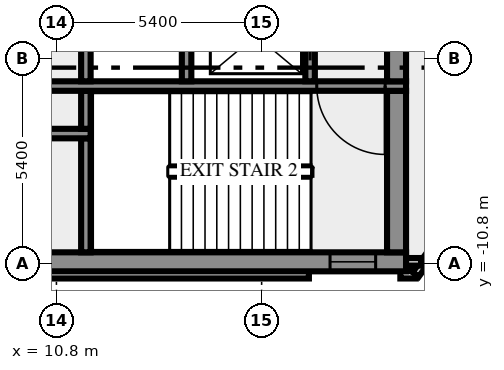
"""IFC4 building model, lengths in metres.
Left out: names, types, materials, properties, quantities, classifications, styles, units other than length and angle.
Written with IfcOpenShell. Run it as: python <this file> out.ifc"""

import sys

from ifc_helpers import new_model, si_unit, direction, frame, frame_2d, origin, place, context, subcontext, project, spatial, rectangle, extrude, element, fill, save


model = new_model("IFC4")
c1 = context("Model", 3, precision=1e-05, world=origin(), true_north=direction((0.0, 1.0)))
c2 = subcontext(c1, "Body", "Model", "MODEL_VIEW")
j1 = project(units=[si_unit("LENGTHUNIT", "METRE"), si_unit("PLANEANGLEUNIT", "RADIAN")], contexts=[c1])
p1 = place(None, origin())
s1 = spatial("IfcSite", under=j1, at=p1, CompositionType="ELEMENT")
p2 = place(p1, origin())
s2 = spatial("IfcBuilding", under=s1, at=p2, CompositionType="ELEMENT")
p3 = place(p2, frame((0.0, 0.0, 339.0)))
s3 = spatial("IfcBuildingStorey", under=s2, at=p3, CompositionType="ELEMENT", Elevation=339.0)
p4 = place(p3, frame((-17.444, -11.088, 0.0), z_axis=(0.0, 0.0, 1.0), x_axis=(1.0, 0.0, 0.0)))
e1 = element("IfcWall", 1, at=p4, inside=s3, PredefinedType="SOLIDWALL", context=c2, shape_type="SweptSolid", body=[
    extrude(rectangle(XDim=34.888, YDim=0.2, at=frame_2d((17.444, 0.0))), origin(), (0.0, 0.0, 1.0), 3.65),
])
p5 = place(p3, frame((19.85, -11.088, 0.0), z_axis=(0.0, 0.0, 1.0), x_axis=(1.0, 0.0, 0.0)))
e2 = element("IfcWall", 2, at=p5, inside=s3, PredefinedType="SOLIDWALL", context=c2, shape_type="SweptSolid", body=[
    extrude(rectangle(XDim=0.406, YDim=0.2, at=frame_2d((0.203, 0.0))), origin(), (0.0, 0.0, 1.0), 3.65),
])
p6 = place(p3, frame((20.253, -11.083, 0.0), z_axis=(0.0, 0.0, 1.0), x_axis=(0.587766567315, 0.809030569476, 0.0)))
e3 = element("IfcWall", 3, at=p6, inside=s3, PredefinedType="SOLIDWALL", context=c2, shape_type="SweptSolid", body=[
    extrude(rectangle(XDim=2.688, YDim=0.2, at=frame_2d((1.344, 0.0))), origin(), (0.0, 0.0, 1.0), 3.65),
])
p7 = place(p3, frame((19.98, -10.75, 0.0), z_axis=(0.0, 0.0, 1.0), x_axis=(1.0, 0.0, 0.0)))
e4 = element("IfcWall", 4, at=p7, inside=s3, PredefinedType="SOLIDWALL", context=c2, shape_type="SweptSolid", body=[
    extrude(rectangle(XDim=0.417, YDim=0.2, at=frame_2d((0.208, 0.0))), origin(), (0.0, 0.0, 1.0), 3.65),
])
p8 = place(p3, frame((-20.0, -10.75, 0.0), z_axis=(0.0, 0.0, 1.0), x_axis=(1.0, 0.0, 0.0)))
e5 = element("IfcWall", 5, at=p8, inside=s3, PredefinedType="SHEAR", context=c2, shape_type="SweptSolid", body=[
    extrude(rectangle(XDim=40.0, YDim=0.5, at=frame_2d((20.0, 0.0))), origin(), (0.0, 0.0, 1.0), 3.65),
])
p9 = place(p8, frame((0.8, 0.0, 1.0)))
e6 = element("IfcOpeningElement", 6, at=p9, cuts=e5, PredefinedType="OPENING", context=c2, shape_type="SweptSolid", body=[
    extrude(rectangle(XDim=1.2, YDim=1.2, at=frame_2d((0.6, 0.6))), frame((0.0, 0.26, 0.0), z_axis=(0.0, -1.0, 0.0), x_axis=(1.0, 0.0, 0.0)), (0.0, 0.0, 1.0), 0.52),
])
p10 = place(p8, frame((38.0, 0.0, 1.0)))
e7 = element("IfcOpeningElement", 7, at=p10, cuts=e5, PredefinedType="OPENING", context=c2, shape_type="SweptSolid", body=[
    extrude(rectangle(XDim=1.2, YDim=1.2, at=frame_2d((0.6, 0.6))), frame((0.0, 0.26, 0.0), z_axis=(0.0, -1.0, 0.0), x_axis=(1.0, 0.0, 0.0)), (0.0, 0.0, 1.0), 0.52),
])
p11 = place(p3, frame((11.575, -10.5, 0.0), z_axis=(0.0, 0.0, 1.0), x_axis=(0.0, 1.0, 0.0)))
e8 = element("IfcWall", 8, at=p11, inside=s3, PredefinedType="SHEAR", context=c2, shape_type="SweptSolid", body=[
    extrude(rectangle(XDim=3.0, YDim=0.25, at=frame_2d((1.5, 0.0))), origin(), (0.0, 0.0, 1.0), 3.65),
])
p12 = place(p3, frame((19.75, -10.5, 0.0), z_axis=(0.0, 0.0, 1.0), x_axis=(0.0, 1.0, 0.0)))
e9 = element("IfcWall", 9, at=p12, inside=s3, PredefinedType="SHEAR", context=c2, shape_type="SweptSolid", body=[
    extrude(rectangle(XDim=4.25, YDim=0.5, at=frame_2d((2.125, 0.0))), origin(), (0.0, 0.0, 1.0), 3.65),
])
p13 = place(p3, frame((11.7, -7.375, 0.0), z_axis=(0.0, 0.0, 1.0), x_axis=(-1.0, 0.0, 0.0)))
e10 = element("IfcWall", 10, at=p13, inside=s3, PredefinedType="SHEAR", context=c2, shape_type="SweptSolid", body=[
    extrude(rectangle(XDim=23.4, YDim=0.25, at=frame_2d((11.7, 0.0))), origin(), (0.0, 0.0, 1.0), 3.65),
])
p14 = place(p13, frame((22.225, 0.0, 0.0)))
e11 = element("IfcOpeningElement", 11, at=p14, cuts=e10, PredefinedType="OPENING", context=c2, shape_type="SweptSolid", body=[
    extrude(rectangle(XDim=0.8, YDim=2.1, at=frame_2d((0.4, 1.05))), frame((0.0, 0.135, 0.0), z_axis=(0.0, -1.0, 0.0), x_axis=(1.0, 0.0, 0.0)), (0.0, 0.0, 1.0), 0.27),
])
p15 = place(p13, frame((20.2, 0.0, 0.0)))
e12 = element("IfcOpeningElement", 12, at=p15, cuts=e10, PredefinedType="OPENING", context=c2, shape_type="SweptSolid", body=[
    extrude(rectangle(XDim=1.1, YDim=2.1, at=frame_2d((0.55, 1.05))), frame((0.0, 0.135, 0.0), z_axis=(0.0, -1.0, 0.0), x_axis=(1.0, 0.0, 0.0)), (0.0, 0.0, 1.0), 0.27),
])
p16 = place(p13, frame((17.7, 0.0, 0.0)))
e13 = element("IfcOpeningElement", 13, at=p16, cuts=e10, PredefinedType="OPENING", context=c2, shape_type="SweptSolid", body=[
    extrude(rectangle(XDim=1.1, YDim=2.1, at=frame_2d((0.55, 1.05))), frame((0.0, 0.135, 0.0), z_axis=(0.0, -1.0, 0.0), x_axis=(1.0, 0.0, 0.0)), (0.0, 0.0, 1.0), 0.27),
])
p17 = place(p13, frame((15.975, 0.0, 0.0)))
e14 = element("IfcOpeningElement", 14, at=p17, cuts=e10, PredefinedType="OPENING", context=c2, shape_type="SweptSolid", body=[
    extrude(rectangle(XDim=0.8, YDim=2.1, at=frame_2d((0.4, 1.05))), frame((0.0, 0.135, 0.0), z_axis=(0.0, -1.0, 0.0), x_axis=(1.0, 0.0, 0.0)), (0.0, 0.0, 1.0), 0.27),
])
p18 = place(p13, frame((14.2, 0.0, 0.0)))
e15 = element("IfcOpeningElement", 15, at=p18, cuts=e10, PredefinedType="OPENING", context=c2, shape_type="SweptSolid", body=[
    extrude(rectangle(XDim=0.9, YDim=2.1, at=frame_2d((0.45, 1.05))), frame((0.0, 0.135, 0.0), z_axis=(0.0, -1.0, 0.0), x_axis=(1.0, 0.0, 0.0)), (0.0, 0.0, 1.0), 0.27),
])
p19 = place(p13, frame((12.35, 0.0, 0.0)))
e16 = element("IfcOpeningElement", 16, at=p19, cuts=e10, PredefinedType="OPENING", context=c2, shape_type="SweptSolid", body=[
    extrude(rectangle(XDim=0.9, YDim=2.1, at=frame_2d((0.45, 1.05))), frame((0.0, 0.135, 0.0), z_axis=(0.0, -1.0, 0.0), x_axis=(1.0, 0.0, 0.0)), (0.0, 0.0, 1.0), 0.27),
])
p20 = place(p13, frame((10.65, 0.0, 0.0)))
e17 = element("IfcOpeningElement", 17, at=p20, cuts=e10, PredefinedType="OPENING", context=c2, shape_type="SweptSolid", body=[
    extrude(rectangle(XDim=0.9, YDim=2.1, at=frame_2d((0.45, 1.05))), frame((0.0, 0.135, 0.0), z_axis=(0.0, -1.0, 0.0), x_axis=(1.0, 0.0, 0.0)), (0.0, 0.0, 1.0), 0.27),
])
p21 = place(p13, frame((7.713, 0.0, 0.0)))
e18 = element("IfcOpeningElement", 18, at=p21, cuts=e10, PredefinedType="OPENING", context=c2, shape_type="SweptSolid", body=[
    extrude(rectangle(XDim=0.9, YDim=2.1, at=frame_2d((0.45, 1.05))), frame((0.0, 0.135, 0.0), z_axis=(0.0, -1.0, 0.0), x_axis=(1.0, 0.0, 0.0)), (0.0, 0.0, 1.0), 0.27),
])
p22 = place(p13, frame((4.15, 0.0, 0.0)))
e19 = element("IfcOpeningElement", 19, at=p22, cuts=e10, PredefinedType="OPENING", context=c2, shape_type="SweptSolid", body=[
    extrude(rectangle(XDim=0.9, YDim=2.1, at=frame_2d((0.45, 1.05))), frame((0.0, 0.135, 0.0), z_axis=(0.0, -1.0, 0.0), x_axis=(1.0, 0.0, 0.0)), (0.0, 0.0, 1.0), 0.27),
])
p23 = place(p13, frame((1.138, 0.0, 0.0)))
e20 = element("IfcOpeningElement", 20, at=p23, cuts=e10, PredefinedType="OPENING", context=c2, shape_type="SweptSolid", body=[
    extrude(rectangle(XDim=0.9, YDim=2.1, at=frame_2d((0.45, 1.05))), frame((0.0, 0.135, 0.0), z_axis=(0.0, -1.0, 0.0), x_axis=(1.0, 0.0, 0.0)), (0.0, 0.0, 1.0), 0.27),
])
p24 = place(p3, frame((11.575, -7.25, 0.0), z_axis=(0.0, 0.0, 1.0), x_axis=(0.0, 1.0, 0.0)))
e21 = element("IfcWall", 21, at=p24, inside=s3, PredefinedType="SHEAR", context=c2, shape_type="SweptSolid", body=[
    extrude(rectangle(XDim=1.0, YDim=0.25, at=frame_2d((0.5, 0.0))), origin(), (0.0, 0.0, 1.0), 3.65),
])
p25 = place(p3, frame((20.0, -6.125, 0.0), z_axis=(0.0, 0.0, 1.0), x_axis=(-1.0, 0.0, 0.0)))
e22 = element("IfcWall", 22, at=p25, inside=s3, PredefinedType="SHEAR", context=c2, shape_type="SweptSolid", body=[
    extrude(rectangle(XDim=10.8, YDim=0.25, at=frame_2d((5.4, 0.0))), origin(), (0.0, 0.0, 1.0), 3.65),
])
p26 = place(p25, frame((0.55, 0.0, 0.0)))
e23 = element("IfcOpeningElement", 23, at=p26, cuts=e22, PredefinedType="OPENING", context=c2, shape_type="SweptSolid", body=[
    extrude(rectangle(XDim=1.8, YDim=2.1, at=frame_2d((0.9, 1.05))), frame((0.0, 0.135, 0.0), z_axis=(0.0, -1.0, 0.0), x_axis=(1.0, 0.0, 0.0)), (0.0, 0.0, 1.0), 0.27),
])
p27 = place(p3, frame((11.575, -6.0, 0.0), z_axis=(0.0, 0.0, 1.0), x_axis=(0.0, 1.0, 0.0)))
e24 = element("IfcWall", 24, at=p27, inside=s3, PredefinedType="SHEAR", context=c2, shape_type="SweptSolid", body=[
    extrude(rectangle(XDim=1.75, YDim=0.25, at=frame_2d((0.875, 0.0))), origin(), (0.0, 0.0, 1.0), 3.65),
])
p28 = place(p3, frame((14.225, -6.0, 0.0), z_axis=(0.0, 0.0, 1.0), x_axis=(0.0, 1.0, 0.0)))
e25 = element("IfcWall", 25, at=p28, inside=s3, PredefinedType="SHEAR", context=c2, shape_type="SweptSolid", body=[
    extrude(rectangle(XDim=4.3, YDim=0.25, at=frame_2d((2.15, 0.0))), origin(), (0.0, 0.0, 1.0), 3.65),
])
p29 = place(p3, frame((17.475, -6.0, 0.0), z_axis=(0.0, 0.0, 1.0), x_axis=(0.0, 1.0, 0.0)))
e26 = element("IfcWall", 26, at=p29, inside=s3, PredefinedType="SHEAR", context=c2, shape_type="SweptSolid", body=[
    extrude(rectangle(XDim=4.3, YDim=0.25, at=frame_2d((2.15, 0.0))), origin(), (0.0, 0.0, 1.0), 3.65),
])
p30 = place(p29, frame((0.55, 0.0, 0.0)))
e27 = element("IfcOpeningElement", 27, at=p30, cuts=e26, PredefinedType="OPENING", context=c2, shape_type="SweptSolid", body=[
    extrude(rectangle(XDim=1.3, YDim=2.1, at=frame_2d((0.65, 1.05))), frame((0.0, 0.135, 0.0), z_axis=(0.0, -1.0, 0.0), x_axis=(1.0, 0.0, 0.0)), (0.0, 0.0, 1.0), 0.27),
])
p31 = place(p3, frame((19.75, -6.0, 0.0), z_axis=(0.0, 0.0, 1.0), x_axis=(0.0, 1.0, 0.0)))
e28 = element("IfcWall", 28, at=p31, inside=s3, PredefinedType="SHEAR", context=c2, shape_type="SweptSolid", body=[
    extrude(rectangle(XDim=4.3, YDim=0.5, at=frame_2d((2.15, 0.0))), origin(), (0.0, 0.0, 1.0), 3.65),
])
p32 = place(p10, origin())
e29 = element("IfcWindow", 29, at=p32, inside=s3, PartitioningType="SINGLE_PANEL", PredefinedType="WINDOW", context=c2, shape_type="SweptSolid", body=[
    extrude(rectangle(XDim=1.2, YDim=1.2, at=frame_2d((0.6, 0.6))), frame((0.0, 0.03, 0.0), z_axis=(0.0, -1.0, 0.0), x_axis=(1.0, 0.0, 0.0)), (0.0, 0.0, 1.0), 0.06),
])
fill(e7, e29)
p33 = place(p26, origin())
e30 = element("IfcDoor", 30, at=p33, inside=s3, OperationType="DOUBLE_DOOR_SINGLE_SWING", PredefinedType="DOOR", context=c2, shape_type="SweptSolid", body=[
    extrude(rectangle(XDim=1.8, YDim=2.1, at=frame_2d((0.9, 1.05))), frame((0.0, 0.025, 0.0), z_axis=(0.0, -1.0, 0.0), x_axis=(1.0, 0.0, 0.0)), (0.0, 0.0, 1.0), 0.05),
])
fill(e23, e30)
p34 = place(p30, origin())
e31 = element("IfcDoor", 31, at=p34, inside=s3, OperationType="DOUBLE_DOOR_SLIDING", PredefinedType="DOOR", context=c2, shape_type="SweptSolid", body=[
    extrude(rectangle(XDim=1.3, YDim=2.1, at=frame_2d((0.65, 1.05))), frame((0.0, 0.025, 0.0), z_axis=(0.0, -1.0, 0.0), x_axis=(1.0, 0.0, 0.0)), (0.0, 0.0, 1.0), 0.05),
])
fill(e27, e31)
save(model, sys.argv[1])
